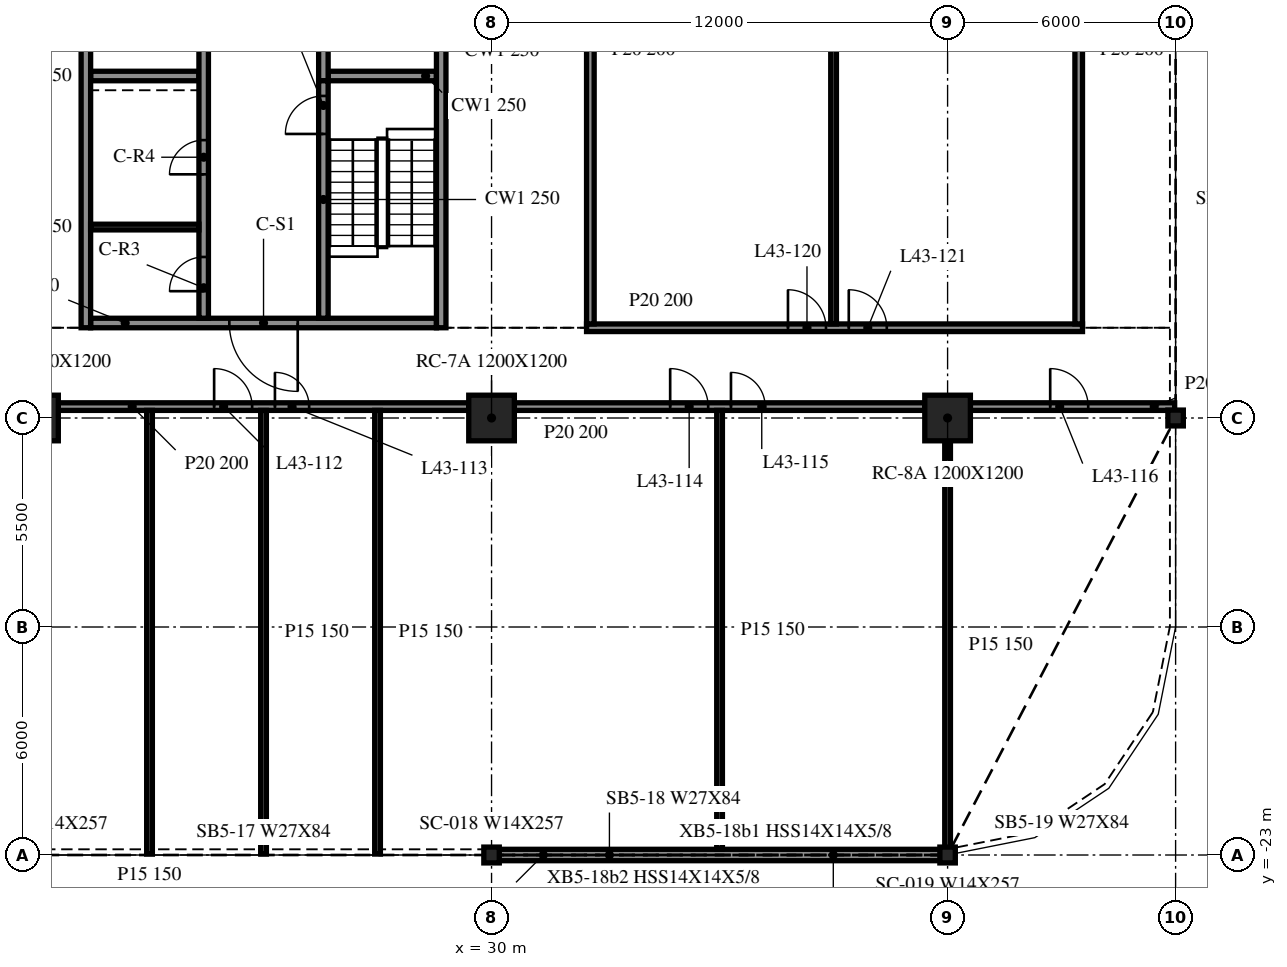
"""IFC4 building model, lengths in metres.
Left out: names, types, materials, properties, quantities, classifications, styles, units other than length and angle.
Written with IfcOpenShell. Run it as: python <this file> out.ifc"""

import sys

from ifc_helpers import new_model, si_unit, direction, frame, frame_2d, origin, origin_2d, place, context, subcontext, project, spatial, rectangle, i_section, extrude, element, fill, save


model = new_model("IFC4")
c1 = context("Model", 3, precision=1e-05, world=origin(), true_north=direction((0.0, 1.0)))
c2 = subcontext(c1, "Body", "Model", "MODEL_VIEW")
j1 = project(units=[si_unit("LENGTHUNIT", "METRE"), si_unit("PLANEANGLEUNIT", "RADIAN")], contexts=[c1])
p1 = place(None, origin())
s1 = spatial("IfcSite", under=j1, at=p1, CompositionType="ELEMENT")
p2 = place(p1, origin())
s2 = spatial("IfcBuilding", under=s1, at=p2, CompositionType="ELEMENT")
p3 = place(p2, frame((0.0, 0.0, 182.0)))
s3 = spatial("IfcBuildingStorey", under=s2, at=p3, CompositionType="ELEMENT", Elevation=182.0)
for number, where, z_axis, x_axis in (
    (1, (18.0, -11.5, -0.34), (0.0, 0.0, 1.0), (1.0, 0.0, 0.0)),
    (2, (30.0, -11.5, -0.34), (0.0, 0.0, 1.0), (1.0, 0.0, 0.0)),
    (3, (42.0, -11.5, -0.34), (0.0, 0.0, 1.0), (1.0, 0.0, 0.0)),
):
    element("IfcColumn", number, at=place(p3, frame(where, z_axis=z_axis, x_axis=x_axis)), inside=s3, PredefinedType="COLUMN", context=c2, shape_type="SweptSolid", body=[
        extrude(rectangle(XDim=1.2, YDim=1.2, at=origin_2d()), origin(), (0.0, 0.0, 1.0), 3.8),
    ])
for number, where, z_axis, x_axis in (
    (4, (30.0, -23.0, -0.34), (0.0, 0.0, 1.0), (1.0, 0.0, 0.0)),
    (5, (42.0, -23.0, -0.34), (0.0, 0.0, 1.0), (1.0, 0.0, 0.0)),
    (6, (48.0, -11.5, -0.34), (0.0, 0.0, 1.0), (1.0, 0.0, 0.0)),
):
    element("IfcColumn", number, at=place(p3, frame(where, z_axis=z_axis, x_axis=x_axis)), inside=s3, PredefinedType="COLUMN", context=c2, shape_type="SweptSolid", body=[
        extrude(i_section(OverallWidth=0.406, OverallDepth=0.417, WebThickness=0.03, FlangeThickness=0.048, at=origin_2d()), origin(), (0.0, 0.0, 1.0), 3.8),
    ])
p4 = place(p3, frame((30.015, -23.0, 0.0), z_axis=(0.0, 0.0, 1.0), x_axis=(1.0, 0.0, 0.0)))
e7 = element("IfcWall", 7, at=p4, inside=s3, PredefinedType="NOTDEFINED", context=c2, shape_type="SweptSolid", body=[
    extrude(rectangle(XDim=11.97, YDim=0.3, at=frame_2d((5.985, 0.0))), origin(), (0.0, 0.0, 1.0), 2.782),
])
p5 = place(p3, frame((19.325, 15.125, 0.0), z_axis=(0.0, 0.0, 1.0), x_axis=(0.0, -1.0, 0.0)))
e8 = element("IfcWall", 8, at=p5, inside=s3, PredefinedType="SOLIDWALL", context=c2, shape_type="SweptSolid", body=[
    extrude(rectangle(XDim=24.25, YDim=0.25, at=frame_2d((12.125, 0.0))), origin(), (0.0, 0.0, 1.0), 3.46),
])
p6 = place(p3, frame((28.675, -9.125, 0.0), z_axis=(0.0, 0.0, 1.0), x_axis=(0.0, 1.0, 0.0)))
e9 = element("IfcWall", 9, at=p6, inside=s3, PredefinedType="SOLIDWALL", context=c2, shape_type="SweptSolid", body=[
    extrude(rectangle(XDim=24.25, YDim=0.25, at=frame_2d((12.125, 0.0))), origin(), (0.0, 0.0, 1.0), 3.46),
])
p7 = place(p6, frame((14.425, 0.0, 0.0)))
e10 = element("IfcOpeningElement", 10, at=p7, cuts=e9, PredefinedType="OPENING", context=c2, shape_type="SweptSolid", body=[
    extrude(rectangle(XDim=0.9, YDim=2.1, at=frame_2d((0.45, 1.05))), frame((0.0, 0.135, 0.0), z_axis=(0.0, -1.0, 0.0), x_axis=(1.0, 0.0, 0.0)), (0.0, 0.0, 1.0), 0.27),
])
p8 = place(p6, frame((19.012, 0.0, 0.0)))
e11 = element("IfcOpeningElement", 11, at=p8, cuts=e9, PredefinedType="OPENING", context=c2, shape_type="SweptSolid", body=[
    extrude(rectangle(XDim=0.9, YDim=2.1, at=frame_2d((0.45, 1.05))), frame((0.0, 0.135, 0.0), z_axis=(0.0, -1.0, 0.0), x_axis=(1.0, 0.0, 0.0)), (0.0, 0.0, 1.0), 0.27),
])
p9 = place(p6, frame((22.087, 0.0, 0.0)))
e12 = element("IfcOpeningElement", 12, at=p9, cuts=e9, PredefinedType="OPENING", context=c2, shape_type="SweptSolid", body=[
    extrude(rectangle(XDim=0.9, YDim=2.1, at=frame_2d((0.45, 1.05))), frame((0.0, 0.135, 0.0), z_axis=(0.0, -1.0, 0.0), x_axis=(1.0, 0.0, 0.0)), (0.0, 0.0, 1.0), 0.27),
])
p10 = place(p3, frame((28.55, -9.0, 0.0), z_axis=(0.0, 0.0, 1.0), x_axis=(-1.0, 0.0, 0.0)))
e13 = element("IfcWall", 13, at=p10, inside=s3, PredefinedType="SOLIDWALL", context=c2, shape_type="SweptSolid", body=[
    extrude(rectangle(XDim=9.1, YDim=0.25, at=frame_2d((4.55, 0.0))), origin(), (0.0, 0.0, 1.0), 3.46),
])
p11 = place(p10, frame((3.65, 0.0, 0.0)))
e14 = element("IfcOpeningElement", 14, at=p11, cuts=e13, PredefinedType="OPENING", context=c2, shape_type="SweptSolid", body=[
    extrude(rectangle(XDim=1.8, YDim=2.1, at=frame_2d((0.9, 1.05))), frame((0.0, 0.135, 0.0), z_axis=(0.0, -1.0, 0.0), x_axis=(1.0, 0.0, 0.0)), (0.0, 0.0, 1.0), 0.27),
])
p12 = place(p3, frame((22.425, -8.875, 0.0), z_axis=(0.0, 0.0, 1.0), x_axis=(0.0, 1.0, 0.0)))
e15 = element("IfcWall", 15, at=p12, inside=s3, PredefinedType="SOLIDWALL", context=c2, shape_type="SweptSolid", body=[
    extrude(rectangle(XDim=17.5, YDim=0.25, at=frame_2d((8.75, 0.0))), origin(), (0.0, 0.0, 1.0), 3.46),
])
p13 = place(p12, frame((7.2, 0.0, 0.0)))
e16 = element("IfcOpeningElement", 16, at=p13, cuts=e15, PredefinedType="OPENING", context=c2, shape_type="SweptSolid", body=[
    extrude(rectangle(XDim=1.1, YDim=2.1, at=frame_2d((0.55, 1.05))), frame((0.0, 0.135, 0.0), z_axis=(0.0, -1.0, 0.0), x_axis=(1.0, 0.0, 0.0)), (0.0, 0.0, 1.0), 0.27),
])
p14 = place(p12, frame((9.95, 0.0, 0.0)))
e17 = element("IfcOpeningElement", 17, at=p14, cuts=e15, PredefinedType="OPENING", context=c2, shape_type="SweptSolid", body=[
    extrude(rectangle(XDim=1.1, YDim=2.1, at=frame_2d((0.55, 1.05))), frame((0.0, 0.135, 0.0), z_axis=(0.0, -1.0, 0.0), x_axis=(1.0, 0.0, 0.0)), (0.0, 0.0, 1.0), 0.27),
])
p15 = place(p12, frame((12.7, 0.0, 0.0)))
e18 = element("IfcOpeningElement", 18, at=p15, cuts=e15, PredefinedType="OPENING", context=c2, shape_type="SweptSolid", body=[
    extrude(rectangle(XDim=1.1, YDim=2.1, at=frame_2d((0.55, 1.05))), frame((0.0, 0.135, 0.0), z_axis=(0.0, -1.0, 0.0), x_axis=(1.0, 0.0, 0.0)), (0.0, 0.0, 1.0), 0.27),
])
p16 = place(p12, frame((15.45, 0.0, 0.0)))
e19 = element("IfcOpeningElement", 19, at=p16, cuts=e15, PredefinedType="OPENING", context=c2, shape_type="SweptSolid", body=[
    extrude(rectangle(XDim=1.1, YDim=2.1, at=frame_2d((0.55, 1.05))), frame((0.0, 0.135, 0.0), z_axis=(0.0, -1.0, 0.0), x_axis=(1.0, 0.0, 0.0)), (0.0, 0.0, 1.0), 0.27),
])
p17 = place(p12, frame((0.712, 0.0, 0.0)))
e20 = element("IfcOpeningElement", 20, at=p17, cuts=e15, PredefinedType="OPENING", context=c2, shape_type="SweptSolid", body=[
    extrude(rectangle(XDim=0.9, YDim=2.1, at=frame_2d((0.45, 1.05))), frame((0.0, 0.135, 0.0), z_axis=(0.0, -1.0, 0.0), x_axis=(1.0, 0.0, 0.0)), (0.0, 0.0, 1.0), 0.27),
])
p18 = place(p12, frame((3.788, 0.0, 0.0)))
e21 = element("IfcOpeningElement", 21, at=p18, cuts=e15, PredefinedType="OPENING", context=c2, shape_type="SweptSolid", body=[
    extrude(rectangle(XDim=0.9, YDim=2.1, at=frame_2d((0.45, 1.05))), frame((0.0, 0.135, 0.0), z_axis=(0.0, -1.0, 0.0), x_axis=(1.0, 0.0, 0.0)), (0.0, 0.0, 1.0), 0.27),
])
p19 = place(p3, frame((25.575, -8.875, 0.0), z_axis=(0.0, 0.0, 1.0), x_axis=(0.0, 1.0, 0.0)))
e22 = element("IfcWall", 22, at=p19, inside=s3, PredefinedType="SOLIDWALL", context=c2, shape_type="SweptSolid", body=[
    extrude(rectangle(XDim=6.25, YDim=0.25, at=frame_2d((3.125, 0.0))), origin(), (0.0, 0.0, 1.0), 3.46),
])
p20 = place(p19, frame((4.85, 0.0, 0.0)))
e23 = element("IfcOpeningElement", 23, at=p20, cuts=e22, PredefinedType="OPENING", context=c2, shape_type="SweptSolid", body=[
    extrude(rectangle(XDim=1.0, YDim=2.1, at=frame_2d((0.5, 1.05))), frame((0.0, 0.135, 0.0), z_axis=(0.0, -1.0, 0.0), x_axis=(1.0, 0.0, 0.0)), (0.0, 0.0, 1.0), 0.27),
])
p21 = place(p3, frame((25.575, 14.875, 0.0), z_axis=(0.0, 0.0, 1.0), x_axis=(0.0, -1.0, 0.0)))
e24 = element("IfcWall", 24, at=p21, inside=s3, PredefinedType="SOLIDWALL", context=c2, shape_type="SweptSolid", body=[
    extrude(rectangle(XDim=17.5, YDim=0.25, at=frame_2d((8.75, 0.0))), origin(), (0.0, 0.0, 1.0), 3.46),
])
p22 = place(p21, frame((15.45, 0.0, 0.0)))
e25 = element("IfcOpeningElement", 25, at=p22, cuts=e24, PredefinedType="OPENING", context=c2, shape_type="SweptSolid", body=[
    extrude(rectangle(XDim=1.1, YDim=2.1, at=frame_2d((0.55, 1.05))), frame((0.0, 0.135, 0.0), z_axis=(0.0, -1.0, 0.0), x_axis=(1.0, 0.0, 0.0)), (0.0, 0.0, 1.0), 0.27),
])
p23 = place(p21, frame((12.8, 0.0, 0.0)))
e26 = element("IfcOpeningElement", 26, at=p23, cuts=e24, PredefinedType="OPENING", context=c2, shape_type="SweptSolid", body=[
    extrude(rectangle(XDim=0.9, YDim=2.1, at=frame_2d((0.45, 1.05))), frame((0.0, 0.135, 0.0), z_axis=(0.0, -1.0, 0.0), x_axis=(1.0, 0.0, 0.0)), (0.0, 0.0, 1.0), 0.27),
])
for number, where, z_axis, x_axis in (
    (27, (19.45, -2.5, 0.0), (0.0, 0.0, 1.0), (1.0, 0.0, 0.0)),
    (28, (25.7, -2.5, 0.0), (0.0, 0.0, 1.0), (1.0, 0.0, 0.0)),
):
    element("IfcWall", number, at=place(p3, frame(where, z_axis=z_axis, x_axis=x_axis)), inside=s3, PredefinedType="SOLIDWALL", context=c2, shape_type="SweptSolid", body=[
        extrude(rectangle(XDim=2.85, YDim=0.25, at=frame_2d((1.425, 0.0))), origin(), (0.0, 0.0, 1.0), 3.46),
    ])
p24 = place(p3, frame((19.45, -6.475, 0.0), z_axis=(0.0, 0.0, 1.0), x_axis=(1.0, 0.0, 0.0)))
e29 = element("IfcWall", 29, at=p24, inside=s3, PredefinedType="PARTITIONING", context=c2, shape_type="SweptSolid", body=[
    extrude(rectangle(XDim=2.85, YDim=0.15, at=frame_2d((1.425, 0.0))), origin(), (0.0, 0.0, 1.0), 3.46),
])
p25 = place(p3, frame((18.6, -11.2, 0.0), z_axis=(0.0, 0.0, 1.0), x_axis=(1.0, 0.0, 0.0)))
e30 = element("IfcWall", 30, at=p25, inside=s3, PredefinedType="PARTITIONING", context=c2, shape_type="SweptSolid", body=[
    extrude(rectangle(XDim=10.8, YDim=0.2, at=frame_2d((5.4, 0.0))), origin(), (0.0, 0.0, 1.0), 3.46),
])
p26 = place(p25, frame((4.1, 0.0, 0.0)))
e31 = element("IfcOpeningElement", 31, at=p26, cuts=e30, PredefinedType="OPENING", context=c2, shape_type="SweptSolid", body=[
    extrude(rectangle(XDim=1.0, YDim=2.1, at=frame_2d((0.5, 1.05))), frame((0.0, 0.11, 0.0), z_axis=(0.0, -1.0, 0.0), x_axis=(1.0, 0.0, 0.0)), (0.0, 0.0, 1.0), 0.22),
])
p27 = place(p25, frame((5.7, 0.0, 0.0)))
e32 = element("IfcOpeningElement", 32, at=p27, cuts=e30, PredefinedType="OPENING", context=c2, shape_type="SweptSolid", body=[
    extrude(rectangle(XDim=0.9, YDim=2.1, at=frame_2d((0.45, 1.05))), frame((0.0, 0.11, 0.0), z_axis=(0.0, -1.0, 0.0), x_axis=(1.0, 0.0, 0.0)), (0.0, 0.0, 1.0), 0.22),
])
p28 = place(p3, frame((30.6, -11.2, 0.0), z_axis=(0.0, 0.0, 1.0), x_axis=(1.0, 0.0, 0.0)))
e33 = element("IfcWall", 33, at=p28, inside=s3, PredefinedType="PARTITIONING", context=c2, shape_type="SweptSolid", body=[
    extrude(rectangle(XDim=10.8, YDim=0.2, at=frame_2d((5.4, 0.0))), origin(), (0.0, 0.0, 1.0), 3.46),
])
p29 = place(p28, frame((4.1, 0.0, 0.0)))
e34 = element("IfcOpeningElement", 34, at=p29, cuts=e33, PredefinedType="OPENING", context=c2, shape_type="SweptSolid", body=[
    extrude(rectangle(XDim=1.0, YDim=2.1, at=frame_2d((0.5, 1.05))), frame((0.0, 0.11, 0.0), z_axis=(0.0, -1.0, 0.0), x_axis=(1.0, 0.0, 0.0)), (0.0, 0.0, 1.0), 0.22),
])
p30 = place(p28, frame((5.7, 0.0, 0.0)))
e35 = element("IfcOpeningElement", 35, at=p30, cuts=e33, PredefinedType="OPENING", context=c2, shape_type="SweptSolid", body=[
    extrude(rectangle(XDim=0.9, YDim=2.1, at=frame_2d((0.45, 1.05))), frame((0.0, 0.11, 0.0), z_axis=(0.0, -1.0, 0.0), x_axis=(1.0, 0.0, 0.0)), (0.0, 0.0, 1.0), 0.22),
])
p31 = place(p3, frame((42.6, -11.2, 0.0), z_axis=(0.0, 0.0, 1.0), x_axis=(1.0, 0.0, 0.0)))
e36 = element("IfcWall", 36, at=p31, inside=s3, PredefinedType="PARTITIONING", context=c2, shape_type="SweptSolid", body=[
    extrude(rectangle(XDim=5.375, YDim=0.2, at=frame_2d((2.688, 0.0))), origin(), (0.0, 0.0, 1.0), 3.46),
])
p32 = place(p31, frame((2.1, 0.0, 0.0)))
e37 = element("IfcOpeningElement", 37, at=p32, cuts=e36, PredefinedType="OPENING", context=c2, shape_type="SweptSolid", body=[
    extrude(rectangle(XDim=1.0, YDim=2.1, at=frame_2d((0.5, 1.05))), frame((0.0, 0.11, 0.0), z_axis=(0.0, -1.0, 0.0), x_axis=(1.0, 0.0, 0.0)), (0.0, 0.0, 1.0), 0.22),
])
p33 = place(p3, frame((32.5, -9.125, 0.0), z_axis=(0.0, 0.0, 1.0), x_axis=(1.0, 0.0, 0.0)))
e38 = element("IfcWall", 38, at=p33, inside=s3, PredefinedType="PARTITIONING", context=c2, shape_type="SweptSolid", body=[
    extrude(rectangle(XDim=13.05, YDim=0.2, at=frame_2d((6.525, 0.0))), origin(), (0.0, 0.0, 1.0), 3.46),
])
p34 = place(p33, frame((5.3, 0.0, 0.0)))
e39 = element("IfcOpeningElement", 39, at=p34, cuts=e38, PredefinedType="OPENING", context=c2, shape_type="SweptSolid", body=[
    extrude(rectangle(XDim=1.0, YDim=2.1, at=frame_2d((0.5, 1.05))), frame((0.0, 0.11, 0.0), z_axis=(0.0, -1.0, 0.0), x_axis=(1.0, 0.0, 0.0)), (0.0, 0.0, 1.0), 0.22),
])
p35 = place(p33, frame((6.9, 0.0, 0.0)))
e40 = element("IfcOpeningElement", 40, at=p35, cuts=e38, PredefinedType="OPENING", context=c2, shape_type="SweptSolid", body=[
    extrude(rectangle(XDim=1.0, YDim=2.1, at=frame_2d((0.5, 1.05))), frame((0.0, 0.11, 0.0), z_axis=(0.0, -1.0, 0.0), x_axis=(1.0, 0.0, 0.0)), (0.0, 0.0, 1.0), 0.22),
])
for number, where, z_axis, x_axis in (
    (41, (21.0, -22.975, 0.0), (0.0, 0.0, 1.0), (0.0, 1.0, 0.0)),
    (42, (24.0, -22.975, 0.0), (0.0, 0.0, 1.0), (0.0, 1.0, 0.0)),
    (43, (27.0, -22.975, 0.0), (0.0, 0.0, 1.0), (0.0, 1.0, 0.0)),
):
    element("IfcWall", number, at=place(p3, frame(where, z_axis=z_axis, x_axis=x_axis)), inside=s3, PredefinedType="PARTITIONING", context=c2, shape_type="SweptSolid", body=[
        extrude(rectangle(XDim=11.675, YDim=0.15, at=frame_2d((5.837, 0.0))), origin(), (0.0, 0.0, 1.0), 3.46),
    ])
p36 = place(p3, frame((32.6, -9.025, 0.0), z_axis=(0.0, 0.0, 1.0), x_axis=(0.0, 1.0, 0.0)))
e44 = element("IfcWall", 44, at=p36, inside=s3, PredefinedType="PARTITIONING", context=c2, shape_type="SweptSolid", body=[
    extrude(rectangle(XDim=24.05, YDim=0.2, at=frame_2d((12.025, 0.0))), origin(), (0.0, 0.0, 1.0), 3.46),
])
p37 = place(p36, frame((11.5, 0.0, 0.0)))
e45 = element("IfcOpeningElement", 45, at=p37, cuts=e44, PredefinedType="OPENING", context=c2, shape_type="SweptSolid", body=[
    extrude(rectangle(XDim=1.0, YDim=2.1, at=frame_2d((0.5, 1.05))), frame((0.0, 0.11, 0.0), z_axis=(0.0, -1.0, 0.0), x_axis=(1.0, 0.0, 0.0)), (0.0, 0.0, 1.0), 0.22),
])
p38 = place(p3, frame((36.0, -22.85, 0.0), z_axis=(0.0, 0.0, 1.0), x_axis=(0.0, 1.0, 0.0)))
e46 = element("IfcWall", 46, at=p38, inside=s3, PredefinedType="PARTITIONING", context=c2, shape_type="SweptSolid", body=[
    extrude(rectangle(XDim=11.55, YDim=0.15, at=frame_2d((5.775, 0.0))), origin(), (0.0, 0.0, 1.0), 3.46),
])
p39 = place(p3, frame((39.0, -9.025, 0.0), z_axis=(0.0, 0.0, 1.0), x_axis=(0.0, 1.0, 0.0)))
e47 = element("IfcWall", 47, at=p39, inside=s3, PredefinedType="PARTITIONING", context=c2, shape_type="SweptSolid", body=[
    extrude(rectangle(XDim=24.05, YDim=0.15, at=frame_2d((12.025, 0.0))), origin(), (0.0, 0.0, 1.0), 3.46),
])
p40 = place(p3, frame((42.0, -22.847, 0.0), z_axis=(0.0, 0.0, 1.0), x_axis=(0.0, 1.0, 0.0)))
e48 = element("IfcWall", 48, at=p40, inside=s3, PredefinedType="PARTITIONING", context=c2, shape_type="SweptSolid", body=[
    extrude(rectangle(XDim=10.747, YDim=0.15, at=frame_2d((5.374, 0.0))), origin(), (0.0, 0.0, 1.0), 3.46),
])
p41 = place(p3, frame((45.45, -9.025, 0.0), z_axis=(0.0, 0.0, 1.0), x_axis=(0.0, 1.0, 0.0)))
e49 = element("IfcWall", 49, at=p41, inside=s3, PredefinedType="PARTITIONING", context=c2, shape_type="SweptSolid", body=[
    extrude(rectangle(XDim=24.05, YDim=0.2, at=frame_2d((12.025, 0.0))), origin(), (0.0, 0.0, 1.0), 3.46),
])
p42 = place(p41, frame((11.5, 0.0, 0.0)))
e50 = element("IfcOpeningElement", 50, at=p42, cuts=e49, PredefinedType="OPENING", context=c2, shape_type="SweptSolid", body=[
    extrude(rectangle(XDim=1.0, YDim=2.1, at=frame_2d((0.5, 1.05))), frame((0.0, 0.11, 0.0), z_axis=(0.0, -1.0, 0.0), x_axis=(1.0, 0.0, 0.0)), (0.0, 0.0, 1.0), 0.22),
])
p43 = place(p11, origin())
e51 = element("IfcDoor", 51, at=p43, inside=s3, OperationType="DOUBLE_DOOR_SINGLE_SWING", PredefinedType="DOOR", context=c2, shape_type="SweptSolid", body=[
    extrude(rectangle(XDim=1.8, YDim=2.1, at=frame_2d((0.9, 1.05))), frame((0.0, 0.025, 0.0), z_axis=(0.0, -1.0, 0.0), x_axis=(1.0, 0.0, 0.0)), (0.0, 0.0, 1.0), 0.05),
])
fill(e14, e51)
p44 = place(p17, origin())
e52 = element("IfcDoor", 52, at=p44, inside=s3, OperationType="SINGLE_SWING_LEFT", PredefinedType="DOOR", context=c2, shape_type="SweptSolid", body=[
    extrude(rectangle(XDim=0.9, YDim=2.1, at=frame_2d((0.45, 1.05))), frame((0.0, 0.025, 0.0), z_axis=(0.0, -1.0, 0.0), x_axis=(1.0, 0.0, 0.0)), (0.0, 0.0, 1.0), 0.05),
])
fill(e20, e52)
p45 = place(p18, origin())
e53 = element("IfcDoor", 53, at=p45, inside=s3, OperationType="SINGLE_SWING_RIGHT", PredefinedType="DOOR", context=c2, shape_type="SweptSolid", body=[
    extrude(rectangle(XDim=0.9, YDim=2.1, at=frame_2d((0.45, 1.05))), frame((0.0, 0.025, 0.0), z_axis=(0.0, -1.0, 0.0), x_axis=(1.0, 0.0, 0.0)), (0.0, 0.0, 1.0), 0.05),
])
fill(e21, e53)
p46 = place(p20, origin())
e54 = element("IfcDoor", 54, at=p46, inside=s3, OperationType="SINGLE_SWING_RIGHT", PredefinedType="DOOR", context=c2, shape_type="SweptSolid", body=[
    extrude(rectangle(XDim=1.0, YDim=2.1, at=frame_2d((0.5, 1.05))), frame((0.0, 0.025, 0.0), z_axis=(0.0, -1.0, 0.0), x_axis=(1.0, 0.0, 0.0)), (0.0, 0.0, 1.0), 0.05),
])
fill(e23, e54)
p47 = place(p26, origin())
e55 = element("IfcDoor", 55, at=p47, inside=s3, OperationType="SINGLE_SWING_RIGHT", PredefinedType="DOOR", context=c2, shape_type="SweptSolid", body=[
    extrude(rectangle(XDim=1.0, YDim=2.1, at=frame_2d((0.5, 1.05))), frame((0.0, 0.025, 0.0), z_axis=(0.0, -1.0, 0.0), x_axis=(1.0, 0.0, 0.0)), (0.0, 0.0, 1.0), 0.05),
])
fill(e31, e55)
p48 = place(p27, origin())
e56 = element("IfcDoor", 56, at=p48, inside=s3, OperationType="SINGLE_SWING_LEFT", PredefinedType="DOOR", context=c2, shape_type="SweptSolid", body=[
    extrude(rectangle(XDim=0.9, YDim=2.1, at=frame_2d((0.45, 1.05))), frame((0.0, 0.025, 0.0), z_axis=(0.0, -1.0, 0.0), x_axis=(1.0, 0.0, 0.0)), (0.0, 0.0, 1.0), 0.05),
])
fill(e32, e56)
p49 = place(p29, origin())
e57 = element("IfcDoor", 57, at=p49, inside=s3, OperationType="SINGLE_SWING_RIGHT", PredefinedType="DOOR", context=c2, shape_type="SweptSolid", body=[
    extrude(rectangle(XDim=1.0, YDim=2.1, at=frame_2d((0.5, 1.05))), frame((0.0, 0.025, 0.0), z_axis=(0.0, -1.0, 0.0), x_axis=(1.0, 0.0, 0.0)), (0.0, 0.0, 1.0), 0.05),
])
fill(e34, e57)
p50 = place(p30, origin())
e58 = element("IfcDoor", 58, at=p50, inside=s3, OperationType="SINGLE_SWING_LEFT", PredefinedType="DOOR", context=c2, shape_type="SweptSolid", body=[
    extrude(rectangle(XDim=0.9, YDim=2.1, at=frame_2d((0.45, 1.05))), frame((0.0, 0.025, 0.0), z_axis=(0.0, -1.0, 0.0), x_axis=(1.0, 0.0, 0.0)), (0.0, 0.0, 1.0), 0.05),
])
fill(e35, e58)
p51 = place(p32, origin())
e59 = element("IfcDoor", 59, at=p51, inside=s3, OperationType="SINGLE_SWING_RIGHT", PredefinedType="DOOR", context=c2, shape_type="SweptSolid", body=[
    extrude(rectangle(XDim=1.0, YDim=2.1, at=frame_2d((0.5, 1.05))), frame((0.0, 0.025, 0.0), z_axis=(0.0, -1.0, 0.0), x_axis=(1.0, 0.0, 0.0)), (0.0, 0.0, 1.0), 0.05),
])
fill(e37, e59)
p52 = place(p34, origin())
e60 = element("IfcDoor", 60, at=p52, inside=s3, OperationType="SINGLE_SWING_LEFT", PredefinedType="DOOR", context=c2, shape_type="SweptSolid", body=[
    extrude(rectangle(XDim=1.0, YDim=2.1, at=frame_2d((0.5, 1.05))), frame((0.0, 0.025, 0.0), z_axis=(0.0, -1.0, 0.0), x_axis=(1.0, 0.0, 0.0)), (0.0, 0.0, 1.0), 0.05),
])
fill(e39, e60)
p53 = place(p35, origin())
e61 = element("IfcDoor", 61, at=p53, inside=s3, OperationType="SINGLE_SWING_RIGHT", PredefinedType="DOOR", context=c2, shape_type="SweptSolid", body=[
    extrude(rectangle(XDim=1.0, YDim=2.1, at=frame_2d((0.5, 1.05))), frame((0.0, 0.025, 0.0), z_axis=(0.0, -1.0, 0.0), x_axis=(1.0, 0.0, 0.0)), (0.0, 0.0, 1.0), 0.05),
])
fill(e40, e61)
save(model, sys.argv[1])
